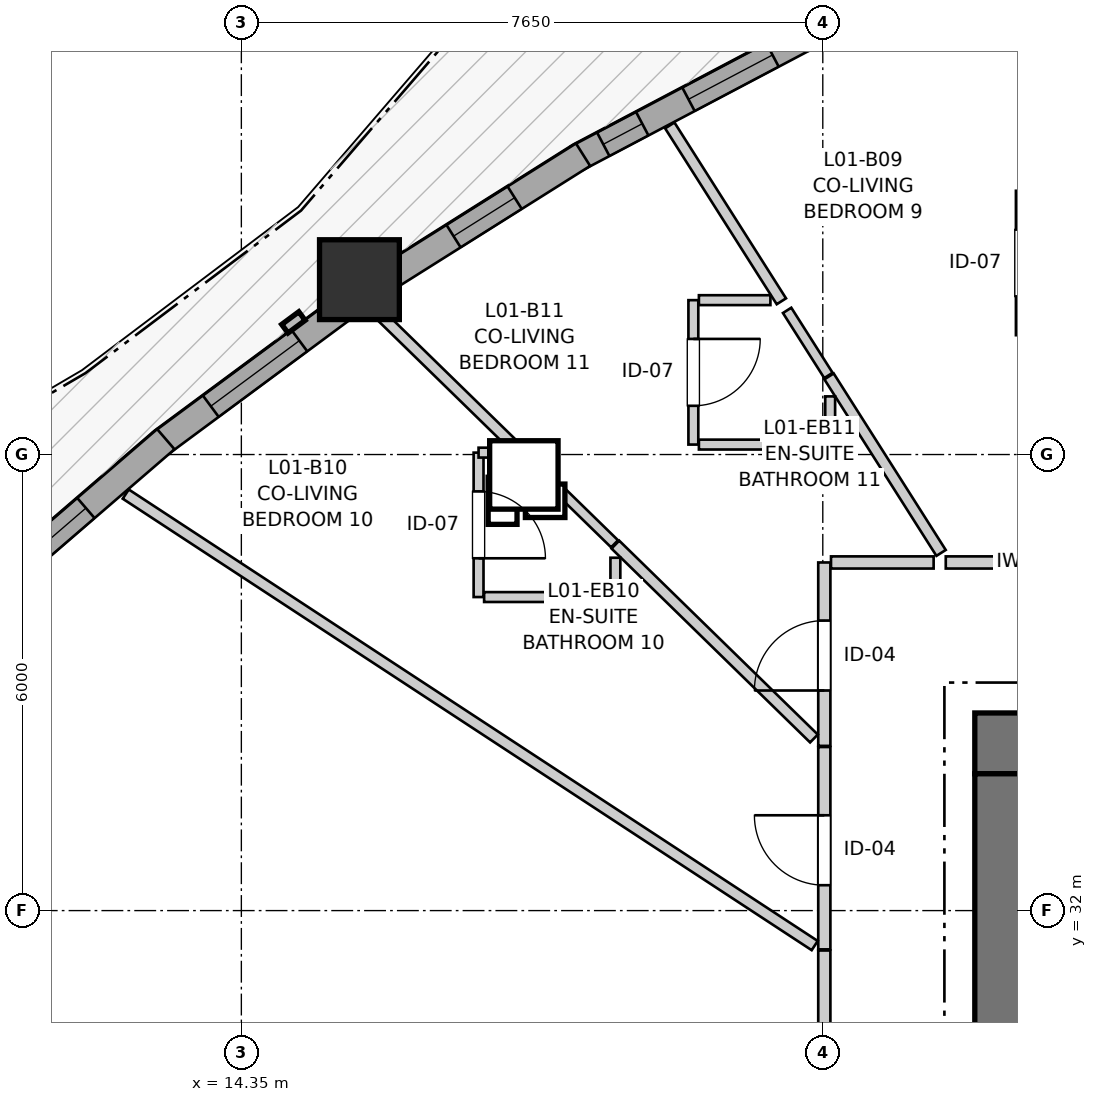
"""IFC4 building model, lengths in metres.
Left out: names, types, materials, properties, quantities, classifications, styles, units other than length and angle.
Written with IfcOpenShell. Run it as: python <this file> out.ifc"""

import sys

from ifc_helpers import new_model, si_unit, direction, frame, frame_2d, origin, origin_2d, place, context, subcontext, project, spatial, rectangle, extrude, source, transform, mapped, element, fill, save


model = new_model("IFC4")
c1 = context("Model", 3, precision=1e-05, world=origin(), true_north=direction((0.0, 1.0)))
c2 = subcontext(c1, "Body", "Model", "MODEL_VIEW")
j1 = project(units=[si_unit("LENGTHUNIT", "METRE"), si_unit("PLANEANGLEUNIT", "RADIAN")], contexts=[c1])
p1 = place(None, origin())
s1 = spatial("IfcSite", under=j1, at=p1, CompositionType="ELEMENT")
p2 = place(p1, origin())
s2 = spatial("IfcBuilding", under=s1, at=p2, CompositionType="ELEMENT")
p3 = place(p2, frame((0.0, 0.0, 7.8)))
s3 = spatial("IfcBuildingStorey", under=s2, at=p3, CompositionType="ELEMENT", Elevation=7.8)
p4 = place(p3, frame((36.7, 34.2, 0.0), z_axis=(0.0, 0.0, 1.0), x_axis=(-1.0, 0.0, 0.0)))
e1 = element("IfcWall", 1, at=p4, inside=s3, PredefinedType="SHEAR", context=c2, shape_type="SweptSolid", body=[
    extrude(rectangle(XDim=12.7, YDim=0.8, at=frame_2d((6.35, 0.0))), origin(), (0.0, 0.0, 1.0), 2.94),
])
p5 = place(p3, frame((24.4, 33.8, 0.0), z_axis=(0.0, 0.0, 1.0), x_axis=(0.0, -1.0, 0.0)))
e2 = element("IfcWall", 2, at=p5, inside=s3, PredefinedType="SHEAR", context=c2, shape_type="SweptSolid", body=[
    extrude(rectangle(XDim=15.6, YDim=0.8, at=frame_2d((7.8, 0.0))), origin(), (0.0, 0.0, 1.0), 2.94),
])
p6 = place(p5, frame((7.05, 0.0, 0.0)))
e3 = element("IfcOpeningElement", 3, at=p6, cuts=e2, PredefinedType="OPENING", context=c2, shape_type="SweptSolid", body=[
    extrude(rectangle(XDim=1.5, YDim=2.15, at=frame_2d((0.75, 1.075))), frame((0.0, 0.41, 0.0), z_axis=(0.0, -1.0, 0.0), x_axis=(1.0, 0.0, 0.0)), (0.0, 0.0, 1.0), 0.82),
])
p7 = place(p5, frame((3.52, 0.0, 0.0)))
e4 = element("IfcOpeningElement", 4, at=p7, cuts=e2, PredefinedType="OPENING", context=c2, shape_type="SweptSolid", body=[
    extrude(rectangle(XDim=0.86, YDim=2.05, at=frame_2d((0.43, 1.025))), frame((0.0, 0.41, 0.0), z_axis=(0.0, -1.0, 0.0), x_axis=(1.0, 0.0, 0.0)), (0.0, 0.0, 1.0), 0.82),
])
p8 = place(p5, frame((11.22, 0.0, 0.0)))
e5 = element("IfcOpeningElement", 5, at=p8, cuts=e2, PredefinedType="OPENING", context=c2, shape_type="SweptSolid", body=[
    extrude(rectangle(XDim=0.86, YDim=2.05, at=frame_2d((0.43, 1.025))), frame((0.0, 0.41, 0.0), z_axis=(0.0, -1.0, 0.0), x_axis=(1.0, 0.0, 0.0)), (0.0, 0.0, 1.0), 0.82),
])
m1 = source(origin(), c2, "Body", "SweptSolid", [
    extrude(rectangle(XDim=1.05, YDim=1.05, at=origin_2d()), origin(), (0.0, 0.0, 1.0), 2.94),
])
p9 = place(p3, frame((15.904, 40.301, 0.0), z_axis=(0.0, 0.0, 1.0), x_axis=(1.0, 0.0, 0.0)))
e6 = element("IfcColumn", 6, at=p9, inside=s3, PredefinedType="COLUMN", context=c2, shape_type="MappedRepresentation", body=[
    mapped(m1, transform((0.0, 0.0, 0.0), x_axis=(1.0, 0.0, 0.0), y_axis=(0.0, 1.0, 0.0), z_axis=(0.0, 0.0, 1.0), scale=1.0)),
])
p10 = place(p3, frame((21.728, 43.462, 0.0), z_axis=(0.0, 0.0, 1.0), x_axis=(-0.884404833282, -0.466720570435, 0.0)))
e7 = element("IfcWall", 7, at=p10, inside=s3, PredefinedType="SOLIDWALL", context=c2, shape_type="SweptSolid", body=[
    extrude(rectangle(XDim=3.346, YDim=0.35, at=frame_2d((1.673, 0.0))), origin(), (0.0, 0.0, 1.0), 2.42),
])
p11 = place(p10, frame((0.44, 0.0, 0.82)))
e8 = element("IfcOpeningElement", 8, at=p11, cuts=e7, PredefinedType="OPENING", context=c2, shape_type="SweptSolid", body=[
    extrude(rectangle(XDim=1.25, YDim=1.35, at=frame_2d((0.625, 0.675))), frame((0.0, 0.185, 0.0), z_axis=(0.0, -1.0, 0.0), x_axis=(1.0, 0.0, 0.0)), (0.0, 0.0, 1.0), 0.37),
])
p12 = place(p10, frame((2.378, 0.0, 0.82)))
e9 = element("IfcOpeningElement", 9, at=p12, cuts=e7, PredefinedType="OPENING", context=c2, shape_type="SweptSolid", body=[
    extrude(rectangle(XDim=0.58, YDim=1.35, at=frame_2d((0.29, 0.675))), frame((0.0, 0.185, 0.0), z_axis=(0.0, -1.0, 0.0), x_axis=(1.0, 0.0, 0.0)), (0.0, 0.0, 1.0), 0.37),
])
p13 = place(p3, frame((18.846, 41.945, 0.0), z_axis=(0.0, 0.0, 1.0), x_axis=(-0.846424281274, -0.532509094824, 0.0)))
e10 = element("IfcWall", 10, at=p13, inside=s3, PredefinedType="SOLIDWALL", context=c2, shape_type="SweptSolid", body=[
    extrude(rectangle(XDim=3.066, YDim=0.35, at=frame_2d((1.533, 0.0))), origin(), (0.0, 0.0, 1.0), 2.42),
])
p14 = place(p13, frame((1.063, 0.0, 0.82)))
e11 = element("IfcOpeningElement", 11, at=p14, cuts=e10, PredefinedType="OPENING", context=c2, shape_type="SweptSolid", body=[
    extrude(rectangle(XDim=0.95, YDim=1.35, at=frame_2d((0.475, 0.675))), frame((0.0, 0.185, 0.0), z_axis=(0.0, -1.0, 0.0), x_axis=(1.0, 0.0, 0.0)), (0.0, 0.0, 1.0), 0.37),
])
p15 = place(p3, frame((15.767, 39.981, 0.0), z_axis=(0.0, 0.0, 1.0), x_axis=(-0.803838872114, -0.59484709605, 0.0)))
e12 = element("IfcWall", 12, at=p15, inside=s3, PredefinedType="SOLIDWALL", context=c2, shape_type="SweptSolid", body=[
    extrude(rectangle(XDim=3.085, YDim=0.35, at=frame_2d((1.542, 0.0))), origin(), (0.0, 0.0, 1.0), 2.42),
])
p16 = place(p15, frame((0.812, 0.0, 0.82)))
e13 = element("IfcOpeningElement", 13, at=p16, cuts=e12, PredefinedType="OPENING", context=c2, shape_type="SweptSolid", body=[
    extrude(rectangle(XDim=1.45, YDim=1.25, at=frame_2d((0.725, 0.625))), frame((0.0, 0.185, 0.0), z_axis=(0.0, -1.0, 0.0), x_axis=(1.0, 0.0, 0.0)), (0.0, 0.0, 1.0), 0.37),
])
p17 = place(p3, frame((13.356, 38.202, 0.0), z_axis=(0.0, 0.0, 1.0), x_axis=(-0.757466232343, -0.65287434232, 0.0)))
e14 = element("IfcWall", 14, at=p17, inside=s3, PredefinedType="SOLIDWALL", context=c2, shape_type="SweptSolid", body=[
    extrude(rectangle(XDim=3.403, YDim=0.35, at=frame_2d((1.702, 0.0))), origin(), (0.0, 0.0, 1.0), 2.42),
])
p18 = place(p17, frame((1.388, 0.0, 0.82)))
e15 = element("IfcOpeningElement", 15, at=p18, cuts=e14, PredefinedType="OPENING", context=c2, shape_type="SweptSolid", body=[
    extrude(rectangle(XDim=1.45, YDim=1.25, at=frame_2d((0.725, 0.625))), frame((0.0, 0.185, 0.0), z_axis=(0.0, -1.0, 0.0), x_axis=(1.0, 0.0, 0.0)), (0.0, 0.0, 1.0), 0.37),
])
p19 = place(p3, frame((23.618, 36.58, 0.0), z_axis=(0.0, 0.0, 1.0), x_axis=(1.0, 0.0, 0.0)))
e16 = element("IfcWall", 16, at=p19, inside=s3, PredefinedType="PARTITIONING", context=c2, shape_type="SweptSolid", body=[
    extrude(rectangle(XDim=4.123, YDim=0.16, at=frame_2d((2.062, 0.0))), origin(), (0.0, 0.0, 1.0), 2.548),
])
p20 = place(p19, frame((1.603, 0.0, 0.0)))
e17 = element("IfcOpeningElement", 17, at=p20, cuts=e16, PredefinedType="OPENING", context=c2, shape_type="SweptSolid", body=[
    extrude(rectangle(XDim=0.92, YDim=2.1, at=frame_2d((0.46, 1.05))), frame((0.0, 0.09, 0.0), z_axis=(0.0, -1.0, 0.0), x_axis=(1.0, 0.0, 0.0)), (0.0, 0.0, 1.0), 0.18),
])
p21 = place(p3, frame((22.02, 27.85, 0.0), z_axis=(0.0, 0.0, 1.0), x_axis=(0.0, 1.0, 0.0)))
e18 = element("IfcWall", 18, at=p21, inside=s3, PredefinedType="PARTITIONING", context=c2, shape_type="SweptSolid", body=[
    extrude(rectangle(XDim=3.625, YDim=0.16, at=frame_2d((1.812, 0.0))), origin(), (0.0, 0.0, 1.0), 2.94),
])
p22 = place(p21, frame((1.353, 0.0, 0.0)))
e19 = element("IfcOpeningElement", 19, at=p22, cuts=e18, PredefinedType="OPENING", context=c2, shape_type="SweptSolid", body=[
    extrude(rectangle(XDim=0.96, YDim=2.1, at=frame_2d((0.48, 1.05))), frame((0.0, 0.09, 0.0), z_axis=(0.0, -1.0, 0.0), x_axis=(1.0, 0.0, 0.0)), (0.0, 0.0, 1.0), 0.18),
])
p23 = place(p3, frame((22.02, 31.49, 0.0), z_axis=(0.0, 0.0, 1.0), x_axis=(0.0, 1.0, 0.0)))
e20 = element("IfcWall", 20, at=p23, inside=s3, PredefinedType="PARTITIONING", context=c2, shape_type="SweptSolid", body=[
    extrude(rectangle(XDim=2.662, YDim=0.16, at=frame_2d((1.331, 0.0))), origin(), (0.0, 0.0, 1.0), 2.94),
])
p24 = place(p23, frame((0.844, 0.0, 0.0)))
e21 = element("IfcOpeningElement", 21, at=p24, cuts=e20, PredefinedType="OPENING", context=c2, shape_type="SweptSolid", body=[
    extrude(rectangle(XDim=0.92, YDim=2.1, at=frame_2d((0.46, 1.05))), frame((0.0, 0.09, 0.0), z_axis=(0.0, -1.0, 0.0), x_axis=(1.0, 0.0, 0.0)), (0.0, 0.0, 1.0), 0.18),
])
p25 = place(p3, frame((22.02, 34.167, 0.0), z_axis=(0.0, 0.0, 1.0), x_axis=(0.0, 1.0, 0.0)))
e22 = element("IfcWall", 22, at=p25, inside=s3, PredefinedType="PARTITIONING", context=c2, shape_type="SweptSolid", body=[
    extrude(rectangle(XDim=2.413, YDim=0.16, at=frame_2d((1.207, 0.0))), origin(), (0.0, 0.0, 1.0), 2.94),
])
p26 = place(p25, frame((0.729, 0.0, 0.0)))
e23 = element("IfcOpeningElement", 23, at=p26, cuts=e22, PredefinedType="OPENING", context=c2, shape_type="SweptSolid", body=[
    extrude(rectangle(XDim=0.92, YDim=2.1, at=frame_2d((0.46, 1.05))), frame((0.0, 0.09, 0.0), z_axis=(0.0, -1.0, 0.0), x_axis=(1.0, 0.0, 0.0)), (0.0, 0.0, 1.0), 0.18),
])
p27 = place(p3, frame((24.606, 41.47, 0.0), z_axis=(0.0, 0.0, 1.0), x_axis=(0.0, -1.0, 0.0)))
e24 = element("IfcWall", 24, at=p27, inside=s3, PredefinedType="PARTITIONING", context=c2, shape_type="SweptSolid", body=[
    extrude(rectangle(XDim=1.9, YDim=0.13, at=frame_2d((0.95, 0.0))), origin(), (0.0, 0.0, 1.0), 2.94),
])
p28 = place(p27, frame((0.51, 0.0, 0.0)))
e25 = element("IfcOpeningElement", 25, at=p28, cuts=e24, PredefinedType="OPENING", context=c2, shape_type="SweptSolid", body=[
    extrude(rectangle(XDim=0.88, YDim=2.05, at=frame_2d((0.44, 1.025))), frame((0.0, 0.075, 0.0), z_axis=(0.0, -1.0, 0.0), x_axis=(1.0, 0.0, 0.0)), (0.0, 0.0, 1.0), 0.15),
])
p29 = place(p3, frame((17.471, 38.025, 0.0), z_axis=(0.0, 0.0, 1.0), x_axis=(0.0, -1.0, 0.0)))
e26 = element("IfcWall", 26, at=p29, inside=s3, PredefinedType="PARTITIONING", context=c2, shape_type="SweptSolid", body=[
    extrude(rectangle(XDim=1.9, YDim=0.13, at=frame_2d((0.95, 0.0))), origin(), (0.0, 0.0, 1.0), 2.94),
])
p30 = place(p29, frame((0.51, 0.0, 0.0)))
e27 = element("IfcOpeningElement", 27, at=p30, cuts=e26, PredefinedType="OPENING", context=c2, shape_type="SweptSolid", body=[
    extrude(rectangle(XDim=0.88, YDim=2.05, at=frame_2d((0.44, 1.025))), frame((0.0, 0.075, 0.0), z_axis=(0.0, -1.0, 0.0), x_axis=(1.0, 0.0, 0.0)), (0.0, 0.0, 1.0), 0.15),
])
p31 = place(p3, frame((20.297, 40.031, 0.0), z_axis=(0.0, 0.0, 1.0), x_axis=(0.0, -1.0, 0.0)))
e28 = element("IfcWall", 28, at=p31, inside=s3, PredefinedType="PARTITIONING", context=c2, shape_type="SweptSolid", body=[
    extrude(rectangle(XDim=1.9, YDim=0.13, at=frame_2d((0.95, 0.0))), origin(), (0.0, 0.0, 1.0), 2.94),
])
p32 = place(p31, frame((0.51, 0.0, 0.0)))
e29 = element("IfcOpeningElement", 29, at=p32, cuts=e28, PredefinedType="OPENING", context=c2, shape_type="SweptSolid", body=[
    extrude(rectangle(XDim=0.88, YDim=2.05, at=frame_2d((0.44, 1.025))), frame((0.0, 0.075, 0.0), z_axis=(0.0, -1.0, 0.0), x_axis=(1.0, 0.0, 0.0)), (0.0, 0.0, 1.0), 0.15),
])
p33 = place(p3, frame((12.829, 37.479, 0.0), z_axis=(0.0, 0.0, 1.0), x_axis=(0.836435846472, -0.548064845376, 0.0)))
e30 = element("IfcWall", 30, at=p33, inside=s3, PredefinedType="PARTITIONING", context=c2, shape_type="SweptSolid", body=[
    extrude(rectangle(XDim=10.838, YDim=0.145, at=frame_2d((5.419, 0.0))), origin(), (0.0, 0.0, 1.0), 2.94),
])
p34 = place(p3, frame((19.271, 36.815, 0.0), z_axis=(0.0, 0.0, 1.0), x_axis=(0.71551452036, -0.698597860828, 0.0)))
e31 = element("IfcWall", 31, at=p34, inside=s3, PredefinedType="PARTITIONING", context=c2, shape_type="SweptSolid", body=[
    extrude(rectangle(XDim=3.651, YDim=0.145, at=frame_2d((1.826, 0.0))), origin(), (0.0, 0.0, 1.0), 2.308),
])
p35 = place(p3, frame((22.082, 39.028, 0.0), z_axis=(0.0, 0.0, 1.0), x_axis=(0.535944885386, -0.844252971465, 0.0)))
e32 = element("IfcWall", 32, at=p35, inside=s3, PredefinedType="PARTITIONING", context=c2, shape_type="SweptSolid", body=[
    extrude(rectangle(XDim=2.751, YDim=0.145, at=frame_2d((1.375, 0.0))), origin(), (0.0, 0.0, 1.0), 2.94),
])
p36 = place(p3, frame((16.034, 39.974, 0.0), z_axis=(0.0, 0.0, 1.0), x_axis=(0.715628345471, -0.69848126042, 0.0)))
e33 = element("IfcWall", 33, at=p36, inside=s3, PredefinedType="PARTITIONING", context=c2, shape_type="SweptSolid", body=[
    extrude(rectangle(XDim=2.791, YDim=0.145, at=frame_2d((1.396, 0.0))), origin(), (0.0, 0.0, 1.0), 2.308),
])
p37 = place(p3, frame((19.987, 42.33, 0.0), z_axis=(0.0, 0.0, 1.0), x_axis=(0.535808561115, -0.844339496788, 0.0)))
e34 = element("IfcWall", 34, at=p37, inside=s3, PredefinedType="PARTITIONING", context=c2, shape_type="SweptSolid", body=[
    extrude(rectangle(XDim=2.74, YDim=0.145, at=frame_2d((1.37, 0.0))), origin(), (0.0, 0.0, 1.0), 2.94),
])
p38 = place(p3, frame((17.544, 36.125, 0.0), z_axis=(0.0, 0.0, 1.0), x_axis=(1.0, 0.0, 0.0)))
e35 = element("IfcWall", 35, at=p38, inside=s3, PredefinedType="PARTITIONING", context=c2, shape_type="SweptSolid", body=[
    extrude(rectangle(XDim=1.727, YDim=0.13, at=frame_2d((0.864, 0.0))), origin(), (0.0, 0.0, 1.0), 2.94),
])
p39 = place(p3, frame((20.37, 38.131, 0.0), z_axis=(0.0, 0.0, 1.0), x_axis=(1.0, 0.0, 0.0)))
e36 = element("IfcWall", 36, at=p39, inside=s3, PredefinedType="PARTITIONING", context=c2, shape_type="SweptSolid", body=[
    extrude(rectangle(XDim=1.727, YDim=0.13, at=frame_2d((0.863, 0.0))), origin(), (0.0, 0.0, 1.0), 2.94),
])
p40 = place(p3, frame((18.042, 38.014, 0.0), z_axis=(0.0, 0.0, 1.0), x_axis=(0.715729497461, -0.698377610225, 0.0)))
e37 = element("IfcWall", 37, at=p40, inside=s3, PredefinedType="PARTITIONING", context=c2, shape_type="SweptSolid", body=[
    extrude(rectangle(XDim=1.702, YDim=0.13, at=frame_2d((0.851, 0.0))), origin(), (0.0, 0.0, 1.0), 2.308),
])
p41 = place(p3, frame((22.108, 36.58, 0.0), z_axis=(0.0, 0.0, 1.0), x_axis=(1.0, 0.0, 0.0)))
e38 = element("IfcWall", 38, at=p41, inside=s3, PredefinedType="PARTITIONING", context=c2, shape_type="SweptSolid", body=[
    extrude(rectangle(XDim=1.35, YDim=0.16, at=frame_2d((0.675, 0.0))), origin(), (0.0, 0.0, 1.0), 2.94),
])
p42 = place(p3, frame((20.37, 40.031, 0.0), z_axis=(0.0, 0.0, 1.0), x_axis=(1.0, 0.0, 0.0)))
e39 = element("IfcWall", 39, at=p42, inside=s3, PredefinedType="PARTITIONING", context=c2, shape_type="SweptSolid", body=[
    extrude(rectangle(XDim=0.941, YDim=0.13, at=frame_2d((0.47, 0.0))), origin(), (0.0, 0.0, 1.0), 2.94),
])
p43 = place(p3, frame((21.531, 39.897, 0.0), z_axis=(0.0, 0.0, 1.0), x_axis=(0.536002688679, -0.844216274262, 0.0)))
e40 = element("IfcWall", 40, at=p43, inside=s3, PredefinedType="PARTITIONING", context=c2, shape_type="SweptSolid", body=[
    extrude(rectangle(XDim=1.014, YDim=0.13, at=frame_2d((0.507, 0.0))), origin(), (0.0, 0.0, 1.0), 2.94),
])
p44 = place(p3, frame((22.097, 38.204, 0.0), z_axis=(0.0, 0.0, 1.0), x_axis=(0.0, 1.0, 0.0)))
e41 = element("IfcWall", 41, at=p44, inside=s3, PredefinedType="PARTITIONING", context=c2, shape_type="SweptSolid", body=[
    extrude(rectangle(XDim=0.561, YDim=0.13, at=frame_2d((0.28, 0.0))), origin(), (0.0, 0.0, 1.0), 2.94),
])
p45 = place(p3, frame((19.271, 36.198, 0.0), z_axis=(0.0, 0.0, 1.0), x_axis=(0.0, 1.0, 0.0)))
e42 = element("IfcWall", 42, at=p45, inside=s3, PredefinedType="PARTITIONING", context=c2, shape_type="SweptSolid", body=[
    extrude(rectangle(XDim=0.444, YDim=0.13, at=frame_2d((0.222, 0.0))), origin(), (0.0, 0.0, 1.0), 2.94),
])
p46 = place(p3, frame((17.471, 38.025, 0.0), z_axis=(0.0, 0.0, 1.0), x_axis=(1.0, 0.0, 0.0)))
e43 = element("IfcWall", 43, at=p46, inside=s3, PredefinedType="PARTITIONING", context=c2, shape_type="SweptSolid", body=[
    extrude(rectangle(XDim=0.47, YDim=0.13, at=frame_2d((0.235, 0.0))), origin(), (0.0, 0.0, 1.0), 2.94),
])
m2 = source(origin(), c2, "Body", "SweptSolid", [
    extrude(rectangle(XDim=1.25, YDim=1.35, at=frame_2d((0.625, 0.675))), frame((0.0, 0.03, 0.0), z_axis=(0.0, -1.0, 0.0), x_axis=(1.0, 0.0, 0.0)), (0.0, 0.0, 1.0), 0.06),
])
p47 = place(p11, origin())
e44 = element("IfcWindow", 44, at=p47, inside=s3, PartitioningType="SINGLE_PANEL", PredefinedType="WINDOW", context=c2, shape_type="MappedRepresentation", body=[
    mapped(m2, transform((0.0, 0.0, 0.0), x_axis=(1.0, 0.0, 0.0), y_axis=(0.0, 1.0, 0.0), z_axis=(0.0, 0.0, 1.0), scale=1.0)),
])
fill(e8, e44)
m3 = source(origin(), c2, "Body", "SweptSolid", [
    extrude(rectangle(XDim=0.58, YDim=1.35, at=frame_2d((0.29, 0.675))), frame((0.0, 0.03, 0.0), z_axis=(0.0, -1.0, 0.0), x_axis=(1.0, 0.0, 0.0)), (0.0, 0.0, 1.0), 0.06),
])
p48 = place(p12, origin())
e45 = element("IfcWindow", 45, at=p48, inside=s3, PartitioningType="SINGLE_PANEL", PredefinedType="WINDOW", context=c2, shape_type="MappedRepresentation", body=[
    mapped(m3, transform((0.0, 0.0, 0.0), x_axis=(1.0, 0.0, 0.0), y_axis=(0.0, 1.0, 0.0), z_axis=(0.0, 0.0, 1.0), scale=1.0)),
])
fill(e9, e45)
m4 = source(origin(), c2, "Body", "SweptSolid", [
    extrude(rectangle(XDim=0.95, YDim=1.35, at=frame_2d((0.475, 0.675))), frame((0.0, 0.03, 0.0), z_axis=(0.0, -1.0, 0.0), x_axis=(1.0, 0.0, 0.0)), (0.0, 0.0, 1.0), 0.06),
])
p49 = place(p14, origin())
e46 = element("IfcWindow", 46, at=p49, inside=s3, PartitioningType="SINGLE_PANEL", PredefinedType="WINDOW", context=c2, shape_type="MappedRepresentation", body=[
    mapped(m4, transform((0.0, 0.0, 0.0), x_axis=(1.0, 0.0, 0.0), y_axis=(0.0, 1.0, 0.0), z_axis=(0.0, 0.0, 1.0), scale=1.0)),
])
fill(e11, e46)
m5 = source(origin(), c2, "Body", "SweptSolid", [
    extrude(rectangle(XDim=1.45, YDim=1.25, at=frame_2d((0.725, 0.625))), frame((0.0, 0.03, 0.0), z_axis=(0.0, -1.0, 0.0), x_axis=(1.0, 0.0, 0.0)), (0.0, 0.0, 1.0), 0.06),
])
p50 = place(p16, origin())
e47 = element("IfcWindow", 47, at=p50, inside=s3, PartitioningType="SINGLE_PANEL", PredefinedType="WINDOW", context=c2, shape_type="MappedRepresentation", body=[
    mapped(m5, transform((0.0, 0.0, 0.0), x_axis=(1.0, 0.0, 0.0), y_axis=(0.0, 1.0, 0.0), z_axis=(0.0, 0.0, 1.0), scale=1.0)),
])
fill(e13, e47)
p51 = place(p18, origin())
e48 = element("IfcWindow", 48, at=p51, inside=s3, PartitioningType="SINGLE_PANEL", PredefinedType="WINDOW", context=c2, shape_type="MappedRepresentation", body=[
    mapped(m5, transform((0.0, 0.0, 0.0), x_axis=(1.0, 0.0, 0.0), y_axis=(0.0, 1.0, 0.0), z_axis=(0.0, 0.0, 1.0), scale=1.0)),
])
fill(e15, e48)
m6 = source(origin(), c2, "Body", "SweptSolid", [
    extrude(rectangle(XDim=0.92, YDim=2.1, at=frame_2d((0.46, 1.05))), frame((0.0, 0.025, 0.0), z_axis=(0.0, -1.0, 0.0), x_axis=(1.0, 0.0, 0.0)), (0.0, 0.0, 1.0), 0.05),
])
p52 = place(p24, origin())
e49 = element("IfcDoor", 49, at=p52, inside=s3, OperationType="SINGLE_SWING_RIGHT", PredefinedType="DOOR", context=c2, shape_type="MappedRepresentation", body=[
    mapped(m6, transform((0.0, 0.0, 0.0), x_axis=(1.0, 0.0, 0.0), y_axis=(0.0, 1.0, 0.0), z_axis=(0.0, 0.0, 1.0), scale=1.0)),
])
fill(e21, e49)
p53 = place(p26, origin())
e50 = element("IfcDoor", 50, at=p53, inside=s3, OperationType="SINGLE_SWING_LEFT", PredefinedType="DOOR", context=c2, shape_type="MappedRepresentation", body=[
    mapped(m6, transform((0.0, 0.0, 0.0), x_axis=(1.0, 0.0, 0.0), y_axis=(0.0, 1.0, 0.0), z_axis=(0.0, 0.0, 1.0), scale=1.0)),
])
fill(e23, e50)
m7 = source(origin(), c2, "Body", "SweptSolid", [
    extrude(rectangle(XDim=0.88, YDim=2.05, at=frame_2d((0.44, 1.025))), frame((0.0, 0.025, 0.0), z_axis=(0.0, -1.0, 0.0), x_axis=(1.0, 0.0, 0.0)), (0.0, 0.0, 1.0), 0.05),
])
p54 = place(p30, origin())
e51 = element("IfcDoor", 51, at=p54, inside=s3, OperationType="SINGLE_SWING_RIGHT", PredefinedType="DOOR", context=c2, shape_type="MappedRepresentation", body=[
    mapped(m7, transform((0.0, 0.0, 0.0), x_axis=(1.0, 0.0, 0.0), y_axis=(0.0, 1.0, 0.0), z_axis=(0.0, 0.0, 1.0), scale=1.0)),
])
fill(e27, e51)
p55 = place(p32, origin())
e52 = element("IfcDoor", 52, at=p55, inside=s3, OperationType="SINGLE_SWING_LEFT", PredefinedType="DOOR", context=c2, shape_type="MappedRepresentation", body=[
    mapped(m7, transform((0.0, 0.0, 0.0), x_axis=(1.0, 0.0, 0.0), y_axis=(0.0, 1.0, 0.0), z_axis=(0.0, 0.0, 1.0), scale=1.0)),
])
fill(e29, e52)
save(model, sys.argv[1])
